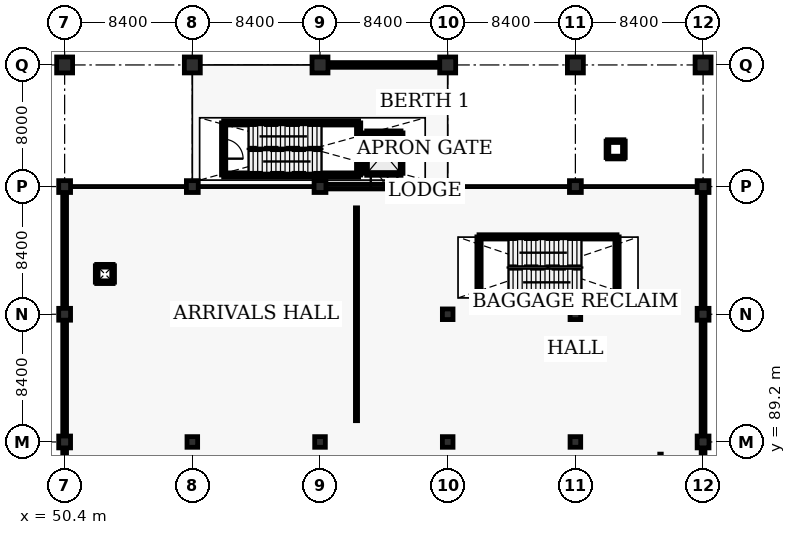
"""IFC4 building model, lengths in metres.
Left out: names, types, materials, properties, quantities, classifications, styles, units other than length and angle.
Written with IfcOpenShell. Run it as: python <this file> out.ifc"""

import sys

from ifc_helpers import new_model, si_unit, direction, frame, frame_2d, origin, origin_2d, place, context, subcontext, project, spatial, rectangle, circle, extrude, element, fill, save


model = new_model("IFC4")
c1 = context("Model", 3, precision=1e-05, world=origin(), true_north=direction((0.0, 1.0)))
c2 = subcontext(c1, "Body", "Model", "MODEL_VIEW")
j1 = project(units=[si_unit("LENGTHUNIT", "METRE"), si_unit("PLANEANGLEUNIT", "RADIAN")], contexts=[c1])
p1 = place(None, origin())
s1 = spatial("IfcSite", under=j1, at=p1, CompositionType="ELEMENT")
p2 = place(p1, origin())
s2 = spatial("IfcBuilding", under=s1, at=p2, CompositionType="ELEMENT")
p3 = place(p2, origin())
s3 = spatial("IfcBuildingStorey", under=s2, at=p3, CompositionType="ELEMENT", Elevation=0.0)
for number, where, z_axis, x_axis in (
    (1, (50.4, 89.2, -0.46), (0.0, 0.0, 1.0), (1.0, 0.0, 0.0)),
    (2, (50.4, 97.6, -0.46), (0.0, 0.0, 1.0), (1.0, 0.0, 0.0)),
    (3, (50.4, 106.0, -0.46), (0.0, 0.0, 1.0), (1.0, 0.0, 0.0)),
):
    element("IfcColumn", number, at=place(p3, frame(where, z_axis=z_axis, x_axis=x_axis)), inside=s3, PredefinedType="COLUMN", context=c2, shape_type="SweptSolid", body=[
        extrude(circle(Radius=0.39, at=origin_2d()), origin(), (0.0, 0.0, 1.0), 5.9),
    ])
for number, where, z_axis, x_axis in (
    (4, (58.8, 89.2, -0.46), (0.0, 0.0, 1.0), (1.0, 0.0, 0.0)),
    (5, (58.8, 97.6, -0.46), (0.0, 0.0, 1.0), (1.0, 0.0, 0.0)),
):
    element("IfcColumn", number, at=place(p3, frame(where, z_axis=z_axis, x_axis=x_axis)), inside=s3, PredefinedType="COLUMN", context=c2, shape_type="SweptSolid", body=[
        extrude(rectangle(XDim=0.7, YDim=0.7, at=origin_2d()), origin(), (0.0, 0.0, 1.0), 5.9),
    ])
p4 = place(p3, frame((58.8, 106.0, -0.46), z_axis=(0.0, 0.0, 1.0), x_axis=(1.0, 0.0, 0.0)))
e6 = element("IfcColumn", 6, at=p4, inside=s3, PredefinedType="COLUMN", context=c2, shape_type="SweptSolid", body=[
    extrude(circle(Radius=0.39, at=origin_2d()), origin(), (0.0, 0.0, 1.0), 5.9),
])
for number, where, z_axis, x_axis in (
    (7, (67.2, 89.2, -0.46), (0.0, 0.0, 1.0), (1.0, 0.0, 0.0)),
    (8, (67.2, 97.6, -0.46), (0.0, 0.0, 1.0), (1.0, 0.0, 0.0)),
):
    element("IfcColumn", number, at=place(p3, frame(where, z_axis=z_axis, x_axis=x_axis)), inside=s3, PredefinedType="COLUMN", context=c2, shape_type="SweptSolid", body=[
        extrude(rectangle(XDim=0.7, YDim=0.7, at=origin_2d()), origin(), (0.0, 0.0, 1.0), 5.9),
    ])
p5 = place(p3, frame((67.2, 106.0, -0.46), z_axis=(0.0, 0.0, 1.0), x_axis=(1.0, 0.0, 0.0)))
e9 = element("IfcColumn", 9, at=p5, inside=s3, PredefinedType="COLUMN", context=c2, shape_type="SweptSolid", body=[
    extrude(circle(Radius=0.39, at=origin_2d()), origin(), (0.0, 0.0, 1.0), 5.9),
])
for number, where, z_axis, x_axis in (
    (10, (75.6, 89.2, -0.46), (0.0, 0.0, 1.0), (1.0, 0.0, 0.0)),
    (11, (75.6, 97.6, -0.46), (0.0, 0.0, 1.0), (1.0, 0.0, 0.0)),
):
    element("IfcColumn", number, at=place(p3, frame(where, z_axis=z_axis, x_axis=x_axis)), inside=s3, PredefinedType="COLUMN", context=c2, shape_type="SweptSolid", body=[
        extrude(rectangle(XDim=0.7, YDim=0.7, at=origin_2d()), origin(), (0.0, 0.0, 1.0), 5.9),
    ])
p6 = place(p3, frame((75.6, 106.0, -0.46), z_axis=(0.0, 0.0, 1.0), x_axis=(1.0, 0.0, 0.0)))
e12 = element("IfcColumn", 12, at=p6, inside=s3, PredefinedType="COLUMN", context=c2, shape_type="SweptSolid", body=[
    extrude(circle(Radius=0.39, at=origin_2d()), origin(), (0.0, 0.0, 1.0), 5.9),
])
for number, where, z_axis, x_axis in (
    (13, (84.0, 89.2, -0.46), (0.0, 0.0, 1.0), (1.0, 0.0, 0.0)),
    (14, (84.0, 97.6, -0.46), (0.0, 0.0, 1.0), (1.0, 0.0, 0.0)),
):
    element("IfcColumn", number, at=place(p3, frame(where, z_axis=z_axis, x_axis=x_axis)), inside=s3, PredefinedType="COLUMN", context=c2, shape_type="SweptSolid", body=[
        extrude(rectangle(XDim=0.7, YDim=0.7, at=origin_2d()), origin(), (0.0, 0.0, 1.0), 5.9),
    ])
for number, where, z_axis, x_axis in (
    (15, (84.0, 106.0, -0.46), (0.0, 0.0, 1.0), (1.0, 0.0, 0.0)),
    (16, (92.4, 89.2, -0.46), (0.0, 0.0, 1.0), (1.0, 0.0, 0.0)),
    (17, (92.4, 97.6, -0.46), (0.0, 0.0, 1.0), (1.0, 0.0, 0.0)),
    (18, (92.4, 106.0, -0.46), (0.0, 0.0, 1.0), (1.0, 0.0, 0.0)),
):
    element("IfcColumn", number, at=place(p3, frame(where, z_axis=z_axis, x_axis=x_axis)), inside=s3, PredefinedType="COLUMN", context=c2, shape_type="SweptSolid", body=[
        extrude(circle(Radius=0.39, at=origin_2d()), origin(), (0.0, 0.0, 1.0), 5.9),
    ])
for number, where, z_axis, x_axis in (
    (19, (50.4, 114.0, -0.46), (0.0, 0.0, 1.0), (1.0, 0.0, 0.0)),
    (20, (58.8, 114.0, -0.46), (0.0, 0.0, 1.0), (1.0, 0.0, 0.0)),
    (21, (67.2, 114.0, -0.46), (0.0, 0.0, 1.0), (1.0, 0.0, 0.0)),
    (22, (75.6, 114.0, -0.46), (0.0, 0.0, 1.0), (1.0, 0.0, 0.0)),
    (23, (84.0, 114.0, -0.46), (0.0, 0.0, 1.0), (1.0, 0.0, 0.0)),
    (24, (92.4, 114.0, -0.46), (0.0, 0.0, 1.0), (1.0, 0.0, 0.0)),
):
    element("IfcColumn", number, at=place(p3, frame(where, z_axis=z_axis, x_axis=x_axis)), inside=s3, PredefinedType="PILASTER", context=c2, shape_type="SweptSolid", body=[
        extrude(circle(Radius=0.525, at=origin_2d()), origin(), (0.0, 0.0, 1.0), 5.9),
    ])
p7 = place(p3, frame((50.4, 88.81, 0.0), z_axis=(0.0, 0.0, 1.0), x_axis=(0.0, -1.0, 0.0)))
e25 = element("IfcWall", 25, at=p7, inside=s3, PredefinedType="SOLIDWALL", context=c2, shape_type="SweptSolid", body=[
    extrude(rectangle(XDim=7.62, YDim=0.25, at=frame_2d((3.81, 0.0))), origin(), (0.0, 0.0, 1.0), 4.605),
])
p8 = place(p7, frame((2.65, 0.0, 1.0)))
e26 = element("IfcOpeningElement", 26, at=p8, cuts=e25, PredefinedType="OPENING", context=c2, shape_type="SweptSolid", body=[
    extrude(rectangle(XDim=1.9, YDim=1.55, at=frame_2d((0.95, 0.775))), frame((0.0, 0.135, 0.0), z_axis=(0.0, -1.0, 0.0), x_axis=(1.0, 0.0, 0.0)), (0.0, 0.0, 1.0), 0.27),
])
p9 = place(p3, frame((92.4, 81.19, 0.0), z_axis=(0.0, 0.0, 1.0), x_axis=(0.0, 1.0, 0.0)))
e27 = element("IfcWall", 27, at=p9, inside=s3, PredefinedType="SOLIDWALL", context=c2, shape_type="SweptSolid", body=[
    extrude(rectangle(XDim=7.62, YDim=0.25, at=frame_2d((3.81, 0.0))), origin(), (0.0, 0.0, 1.0), 4.605),
])
p10 = place(p9, frame((2.65, 0.0, 1.0)))
e28 = element("IfcOpeningElement", 28, at=p10, cuts=e27, PredefinedType="OPENING", context=c2, shape_type="SweptSolid", body=[
    extrude(rectangle(XDim=1.9, YDim=1.55, at=frame_2d((0.95, 0.775))), frame((0.0, 0.135, 0.0), z_axis=(0.0, -1.0, 0.0), x_axis=(1.0, 0.0, 0.0)), (0.0, 0.0, 1.0), 0.27),
])
p11 = place(p3, frame((50.4, 97.21, 0.0), z_axis=(0.0, 0.0, 1.0), x_axis=(0.0, -1.0, 0.0)))
e29 = element("IfcWall", 29, at=p11, inside=s3, PredefinedType="SOLIDWALL", context=c2, shape_type="SweptSolid", body=[
    extrude(rectangle(XDim=7.62, YDim=0.25, at=frame_2d((3.81, 0.0))), origin(), (0.0, 0.0, 1.0), 4.825),
])
p12 = place(p11, frame((2.65, 0.0, 1.0)))
e30 = element("IfcOpeningElement", 30, at=p12, cuts=e29, PredefinedType="OPENING", context=c2, shape_type="SweptSolid", body=[
    extrude(rectangle(XDim=2.5, YDim=1.05, at=frame_2d((1.25, 0.525))), frame((0.0, 0.135, 0.0), z_axis=(0.0, -1.0, 0.0), x_axis=(1.0, 0.0, 0.0)), (0.0, 0.0, 1.0), 0.27),
])
p13 = place(p3, frame((92.4, 89.59, 0.0), z_axis=(0.0, 0.0, 1.0), x_axis=(0.0, 1.0, 0.0)))
e31 = element("IfcWall", 31, at=p13, inside=s3, PredefinedType="SOLIDWALL", context=c2, shape_type="SweptSolid", body=[
    extrude(rectangle(XDim=7.62, YDim=0.25, at=frame_2d((3.81, 0.0))), origin(), (0.0, 0.0, 1.0), 4.605),
])
p14 = place(p13, frame((2.65, 0.0, 1.0)))
e32 = element("IfcOpeningElement", 32, at=p14, cuts=e31, PredefinedType="OPENING", context=c2, shape_type="SweptSolid", body=[
    extrude(rectangle(XDim=2.5, YDim=1.05, at=frame_2d((1.25, 0.525))), frame((0.0, 0.135, 0.0), z_axis=(0.0, -1.0, 0.0), x_axis=(1.0, 0.0, 0.0)), (0.0, 0.0, 1.0), 0.27),
])
p15 = place(p3, frame((50.4, 105.61, 0.0), z_axis=(0.0, 0.0, 1.0), x_axis=(0.0, -1.0, 0.0)))
e33 = element("IfcWall", 33, at=p15, inside=s3, PredefinedType="SOLIDWALL", context=c2, shape_type="SweptSolid", body=[
    extrude(rectangle(XDim=7.62, YDim=0.25, at=frame_2d((3.81, 0.0))), origin(), (0.0, 0.0, 1.0), 4.605),
])
p16 = place(p15, frame((2.65, 0.0, 1.0)))
e34 = element("IfcOpeningElement", 34, at=p16, cuts=e33, PredefinedType="OPENING", context=c2, shape_type="SweptSolid", body=[
    extrude(rectangle(XDim=2.7, YDim=1.65, at=frame_2d((1.35, 0.825))), frame((0.0, 0.135, 0.0), z_axis=(0.0, -1.0, 0.0), x_axis=(1.0, 0.0, 0.0)), (0.0, 0.0, 1.0), 0.27),
])
p17 = place(p3, frame((92.4, 97.99, 0.0), z_axis=(0.0, 0.0, 1.0), x_axis=(0.0, 1.0, 0.0)))
e35 = element("IfcWall", 35, at=p17, inside=s3, PredefinedType="SOLIDWALL", context=c2, shape_type="SweptSolid", body=[
    extrude(rectangle(XDim=7.62, YDim=0.25, at=frame_2d((3.81, 0.0))), origin(), (0.0, 0.0, 1.0), 4.605),
])
p18 = place(p17, frame((2.65, 0.0, 1.0)))
e36 = element("IfcOpeningElement", 36, at=p18, cuts=e35, PredefinedType="OPENING", context=c2, shape_type="SweptSolid", body=[
    extrude(rectangle(XDim=2.7, YDim=1.65, at=frame_2d((1.35, 0.825))), frame((0.0, 0.135, 0.0), z_axis=(0.0, -1.0, 0.0), x_axis=(1.0, 0.0, 0.0)), (0.0, 0.0, 1.0), 0.27),
])
p19 = place(p3, frame((67.59, 106.0, 0.0), z_axis=(0.0, 0.0, 1.0), x_axis=(1.0, 0.0, 0.0)))
e37 = element("IfcWall", 37, at=p19, inside=s3, PredefinedType="SOLIDWALL", context=c2, shape_type="SweptSolid", body=[
    extrude(rectangle(XDim=7.62, YDim=0.31, at=frame_2d((3.81, 0.0))), origin(), (0.0, 0.0, 1.0), 4.605),
])
p20 = place(p19, frame((2.95, 0.0, 0.0)))
e38 = element("IfcOpeningElement", 38, at=p20, cuts=e37, PredefinedType="OPENING", context=c2, shape_type="SweptSolid", body=[
    extrude(rectangle(XDim=1.75, YDim=2.15, at=frame_2d((0.875, 1.075))), frame((0.0, 0.165, 0.0), z_axis=(0.0, -1.0, 0.0), x_axis=(1.0, 0.0, 0.0)), (0.0, 0.0, 1.0), 0.33),
])
p21 = place(p19, frame((5.45, 0.0, 1.05)))
e39 = element("IfcOpeningElement", 39, at=p21, cuts=e37, PredefinedType="OPENING", context=c2, shape_type="SweptSolid", body=[
    extrude(rectangle(XDim=1.4, YDim=1.25, at=frame_2d((0.7, 0.625))), frame((0.0, 0.165, 0.0), z_axis=(0.0, -1.0, 0.0), x_axis=(1.0, 0.0, 0.0)), (0.0, 0.0, 1.0), 0.33),
])
p22 = place(p3, frame((75.075, 114.0, 0.0), z_axis=(0.0, 0.0, 1.0), x_axis=(-1.0, 0.0, 0.0)))
e40 = element("IfcWall", 40, at=p22, inside=s3, PredefinedType="SOLIDWALL", context=c2, shape_type="SweptSolid", body=[
    extrude(rectangle(XDim=7.35, YDim=0.31, at=frame_2d((3.675, 0.0))), origin(), (0.0, 0.0, 1.0), 4.835),
])
p23 = place(p22, frame((2.815, 0.0, 1.05)))
e41 = element("IfcOpeningElement", 41, at=p23, cuts=e40, PredefinedType="OPENING", context=c2, shape_type="SweptSolid", body=[
    extrude(rectangle(XDim=1.4, YDim=1.25, at=frame_2d((0.7, 0.625))), frame((0.0, 0.165, 0.0), z_axis=(0.0, -1.0, 0.0), x_axis=(1.0, 0.0, 0.0)), (0.0, 0.0, 1.0), 0.33),
])
for number, where, z_axis, x_axis in (
    (42, (60.86, 106.76, 0.0), (0.0, 0.0, 1.0), (1.0, 0.0, 0.0)),
    (43, (60.86, 110.19, 0.0), (0.0, 0.0, 1.0), (1.0, 0.0, 0.0)),
):
    element("IfcWall", number, at=place(p3, frame(where, z_axis=z_axis, x_axis=x_axis)), inside=s3, PredefinedType="SHEAR", context=c2, shape_type="SweptSolid", body=[
        extrude(rectangle(XDim=8.88, YDim=0.28, at=frame_2d((4.44, 0.0))), origin(), (0.0, 0.0, 1.0), 5.44),
    ])
p24 = place(p3, frame((60.86, 110.19, 0.0), z_axis=(0.0, 0.0, 1.0), x_axis=(0.0, -1.0, 0.0)))
e44 = element("IfcWall", 44, at=p24, inside=s3, PredefinedType="SHEAR", context=c2, shape_type="SweptSolid", body=[
    extrude(rectangle(XDim=3.43, YDim=0.28, at=frame_2d((1.715, 0.0))), origin(), (0.0, 0.0, 1.0), 5.44),
])
p25 = place(p24, frame((1.075, 0.0, 0.0)))
e45 = element("IfcOpeningElement", 45, at=p25, cuts=e44, PredefinedType="OPENING", context=c2, shape_type="SweptSolid", body=[
    extrude(rectangle(XDim=1.28, YDim=2.1, at=frame_2d((0.64, 1.05))), frame((0.0, 0.15, 0.0), z_axis=(0.0, -1.0, 0.0), x_axis=(1.0, 0.0, 0.0)), (0.0, 0.0, 1.0), 0.3),
])
p26 = place(p3, frame((69.74, 106.76, 0.0), z_axis=(0.0, 0.0, 1.0), x_axis=(0.0, 1.0, 0.0)))
e46 = element("IfcWall", 46, at=p26, inside=s3, PredefinedType="SHEAR", context=c2, shape_type="SweptSolid", body=[
    extrude(rectangle(XDim=3.43, YDim=0.28, at=frame_2d((1.715, 0.0))), origin(), (0.0, 0.0, 1.0), 5.44),
])
p27 = place(p3, frame((70.27, 106.87, 0.0), z_axis=(0.0, 0.0, 1.0), x_axis=(1.0, 0.0, 0.0)))
e47 = element("IfcWall", 47, at=p27, inside=s3, PredefinedType="SHEAR", context=c2, shape_type="SweptSolid", body=[
    extrude(rectangle(XDim=2.26, YDim=0.26, at=frame_2d((1.13, 0.0))), origin(), (0.0, 0.0, 1.0), 5.44),
])
for number, where, z_axis, x_axis in (
    (48, (72.53, 106.87, 0.0), (0.0, 0.0, 1.0), (0.0, 1.0, 0.0)),
    (49, (70.27, 109.53, 0.0), (0.0, 0.0, 1.0), (0.0, -1.0, 0.0)),
):
    element("IfcWall", number, at=place(p3, frame(where, z_axis=z_axis, x_axis=x_axis)), inside=s3, PredefinedType="SHEAR", context=c2, shape_type="SweptSolid", body=[
        extrude(rectangle(XDim=2.66, YDim=0.26, at=frame_2d((1.33, 0.0))), origin(), (0.0, 0.0, 1.0), 5.44),
    ])
p28 = place(p3, frame((70.27, 109.53, 0.0), z_axis=(0.0, 0.0, 1.0), x_axis=(1.0, 0.0, 0.0)))
e50 = element("IfcWall", 50, at=p28, inside=s3, PredefinedType="SHEAR", context=c2, shape_type="SweptSolid", body=[
    extrude(rectangle(XDim=2.26, YDim=0.26, at=frame_2d((1.13, 0.0))), origin(), (0.0, 0.0, 1.0), 5.44),
])
p29 = place(p28, frame((0.51, 0.0, 0.0)))
e51 = element("IfcOpeningElement", 51, at=p29, cuts=e50, PredefinedType="OPENING", context=c2, shape_type="SweptSolid", body=[
    extrude(rectangle(XDim=1.24, YDim=2.14, at=frame_2d((0.62, 1.07))), frame((0.0, 0.14, 0.0), z_axis=(0.0, -1.0, 0.0), x_axis=(1.0, 0.0, 0.0)), (0.0, 0.0, 1.0), 0.28),
])
for number, where, z_axis, x_axis in (
    (52, (77.66, 98.66, 0.0), (0.0, 0.0, 1.0), (1.0, 0.0, 0.0)),
    (53, (77.66, 102.69, 0.0), (0.0, 0.0, 1.0), (1.0, 0.0, 0.0)),
):
    element("IfcWall", number, at=place(p3, frame(where, z_axis=z_axis, x_axis=x_axis)), inside=s3, PredefinedType="SHEAR", context=c2, shape_type="SweptSolid", body=[
        extrude(rectangle(XDim=9.08, YDim=0.28, at=frame_2d((4.54, 0.0))), origin(), (0.0, 0.0, 1.0), 5.44),
    ])
p30 = place(p3, frame((77.66, 102.69, 0.0), z_axis=(0.0, 0.0, 1.0), x_axis=(0.0, -1.0, 0.0)))
e54 = element("IfcWall", 54, at=p30, inside=s3, PredefinedType="SHEAR", context=c2, shape_type="SweptSolid", body=[
    extrude(rectangle(XDim=4.03, YDim=0.28, at=frame_2d((2.015, 0.0))), origin(), (0.0, 0.0, 1.0), 5.44),
])
p31 = place(p30, frame((1.035, 0.0, 0.0)))
e55 = element("IfcOpeningElement", 55, at=p31, cuts=e54, PredefinedType="OPENING", context=c2, shape_type="SweptSolid", body=[
    extrude(rectangle(XDim=1.96, YDim=2.22, at=frame_2d((0.98, 1.11))), frame((0.0, 0.15, 0.0), z_axis=(0.0, -1.0, 0.0), x_axis=(1.0, 0.0, 0.0)), (0.0, 0.0, 1.0), 0.3),
])
p32 = place(p3, frame((86.74, 98.66, 0.0), z_axis=(0.0, 0.0, 1.0), x_axis=(0.0, 1.0, 0.0)))
e56 = element("IfcWall", 56, at=p32, inside=s3, PredefinedType="SHEAR", context=c2, shape_type="SweptSolid", body=[
    extrude(rectangle(XDim=4.03, YDim=0.28, at=frame_2d((2.015, 0.0))), origin(), (0.0, 0.0, 1.0), 5.44),
])
for number, where, z_axis, x_axis in (
    (57, (52.51, 99.71, 0.0), (0.0, 0.0, 1.0), (1.0, 0.0, 0.0)),
    (58, (53.59, 99.71, 0.0), (0.0, 0.0, 1.0), (0.0, 1.0, 0.0)),
    (59, (53.59, 100.79, 0.0), (0.0, 0.0, 1.0), (-1.0, 0.0, 0.0)),
    (60, (52.51, 100.79, 0.0), (0.0, 0.0, 1.0), (0.0, -1.0, 0.0)),
):
    element("IfcWall", number, at=place(p3, frame(where, z_axis=z_axis, x_axis=x_axis)), inside=s3, PredefinedType="SOLIDWALL", context=c2, shape_type="SweptSolid", body=[
        extrude(rectangle(XDim=1.08, YDim=0.18, at=frame_2d((0.54, 0.0))), origin(), (0.0, 0.0, 1.0), 2.6),
    ])
p33 = place(p3, frame((86.11, 107.91, 0.0), z_axis=(0.0, 0.0, 1.0), x_axis=(1.0, 0.0, 0.0)))
e61 = element("IfcWall", 61, at=p33, inside=s3, PredefinedType="SOLIDWALL", context=c2, shape_type="SweptSolid", body=[
    extrude(rectangle(XDim=1.08, YDim=0.18, at=frame_2d((0.54, 0.0))), origin(), (0.0, 0.0, 1.0), 2.6),
])
p34 = place(p3, frame((87.19, 107.91, 0.0), z_axis=(0.0, 0.0, 1.0), x_axis=(0.0, 1.0, 0.0)))
e62 = element("IfcWall", 62, at=p34, inside=s3, PredefinedType="SOLIDWALL", context=c2, shape_type="SweptSolid", body=[
    extrude(rectangle(XDim=1.08, YDim=0.18, at=frame_2d((0.54, 0.0))), origin(), (0.0, 0.0, 1.0), 2.6),
])
p35 = place(p3, frame((87.19, 108.99, 0.0), z_axis=(0.0, 0.0, 1.0), x_axis=(-1.0, 0.0, 0.0)))
e63 = element("IfcWall", 63, at=p35, inside=s3, PredefinedType="SOLIDWALL", context=c2, shape_type="SweptSolid", body=[
    extrude(rectangle(XDim=1.08, YDim=0.18, at=frame_2d((0.54, 0.0))), origin(), (0.0, 0.0, 1.0), 2.6),
])
p36 = place(p3, frame((86.11, 108.99, 0.0), z_axis=(0.0, 0.0, 1.0), x_axis=(0.0, -1.0, 0.0)))
e64 = element("IfcWall", 64, at=p36, inside=s3, PredefinedType="SOLIDWALL", context=c2, shape_type="SweptSolid", body=[
    extrude(rectangle(XDim=1.08, YDim=0.18, at=frame_2d((0.54, 0.0))), origin(), (0.0, 0.0, 1.0), 2.6),
])
p37 = place(p3, frame((69.6, 90.6, 0.0), z_axis=(0.0, 0.0, 1.0), x_axis=(0.0, 1.0, 0.0)))
e65 = element("IfcWall", 65, at=p37, inside=s3, PredefinedType="PARTITIONING", context=c2, shape_type="SweptSolid", body=[
    extrude(rectangle(XDim=14.0, YDim=0.14, at=frame_2d((7.0, 0.0))), origin(), (0.0, 0.0, 1.0), 3.1),
])
p38 = place(p37, frame((2.4, 0.0, 0.0)))
e66 = element("IfcOpeningElement", 66, at=p38, cuts=e65, PredefinedType="OPENING", context=c2, shape_type="SweptSolid", body=[
    extrude(rectangle(XDim=2.1, YDim=2.22, at=frame_2d((1.05, 1.11))), frame((0.0, 0.08, 0.0), z_axis=(0.0, -1.0, 0.0), x_axis=(1.0, 0.0, 0.0)), (0.0, 0.0, 1.0), 0.16),
])
p39 = place(p3, frame((89.6, 73.2, 0.0), z_axis=(0.0, 0.0, 1.0), x_axis=(0.0, 1.0, 0.0)))
e67 = element("IfcWall", 67, at=p39, inside=s3, PredefinedType="PARTITIONING", context=c2, shape_type="SweptSolid", body=[
    extrude(rectangle(XDim=15.2, YDim=0.1, at=frame_2d((7.6, 0.0))), origin(), (0.0, 0.0, 1.0), 3.0),
])
p40 = place(p39, frame((10.6, 0.0, 0.0)))
e68 = element("IfcOpeningElement", 68, at=p40, cuts=e67, PredefinedType="OPENING", context=c2, shape_type="SweptSolid", body=[
    extrude(rectangle(XDim=1.06, YDim=2.1, at=frame_2d((0.53, 1.05))), frame((0.0, 0.06, 0.0), z_axis=(0.0, -1.0, 0.0), x_axis=(1.0, 0.0, 0.0)), (0.0, 0.0, 1.0), 0.12),
])
p41 = place(p12, origin())
e69 = element("IfcWindow", 69, at=p41, inside=s3, PartitioningType="TRIPLE_PANEL_VERTICAL", PredefinedType="WINDOW", context=c2, shape_type="SweptSolid", body=[
    extrude(rectangle(XDim=2.5, YDim=1.05, at=frame_2d((1.25, 0.525))), frame((0.0, 0.03, 0.0), z_axis=(0.0, -1.0, 0.0), x_axis=(1.0, 0.0, 0.0)), (0.0, 0.0, 1.0), 0.06),
])
fill(e30, e69)
p42 = place(p14, origin())
e70 = element("IfcWindow", 70, at=p42, inside=s3, PartitioningType="TRIPLE_PANEL_VERTICAL", PredefinedType="WINDOW", context=c2, shape_type="SweptSolid", body=[
    extrude(rectangle(XDim=2.5, YDim=1.05, at=frame_2d((1.25, 0.525))), frame((0.0, 0.03, 0.0), z_axis=(0.0, -1.0, 0.0), x_axis=(1.0, 0.0, 0.0)), (0.0, 0.0, 1.0), 0.06),
])
fill(e32, e70)
p43 = place(p16, origin())
e71 = element("IfcWindow", 71, at=p43, inside=s3, PartitioningType="TRIPLE_PANEL_VERTICAL", PredefinedType="WINDOW", context=c2, shape_type="SweptSolid", body=[
    extrude(rectangle(XDim=2.7, YDim=1.65, at=frame_2d((1.35, 0.825))), frame((0.0, 0.03, 0.0), z_axis=(0.0, -1.0, 0.0), x_axis=(1.0, 0.0, 0.0)), (0.0, 0.0, 1.0), 0.06),
])
fill(e34, e71)
p44 = place(p18, origin())
e72 = element("IfcWindow", 72, at=p44, inside=s3, PartitioningType="TRIPLE_PANEL_VERTICAL", PredefinedType="WINDOW", context=c2, shape_type="SweptSolid", body=[
    extrude(rectangle(XDim=2.7, YDim=1.65, at=frame_2d((1.35, 0.825))), frame((0.0, 0.03, 0.0), z_axis=(0.0, -1.0, 0.0), x_axis=(1.0, 0.0, 0.0)), (0.0, 0.0, 1.0), 0.06),
])
fill(e36, e72)
p45 = place(p20, origin())
e73 = element("IfcDoor", 73, at=p45, inside=s3, OperationType="DOUBLE_DOOR_SINGLE_SWING", PredefinedType="DOOR", context=c2, shape_type="SweptSolid", body=[
    extrude(rectangle(XDim=1.75, YDim=2.15, at=frame_2d((0.875, 1.075))), frame((0.0, 0.025, 0.0), z_axis=(0.0, -1.0, 0.0), x_axis=(1.0, 0.0, 0.0)), (0.0, 0.0, 1.0), 0.05),
])
fill(e38, e73)
p46 = place(p21, origin())
e74 = element("IfcWindow", 74, at=p46, inside=s3, PartitioningType="SINGLE_PANEL", PredefinedType="WINDOW", context=c2, shape_type="SweptSolid", body=[
    extrude(rectangle(XDim=1.4, YDim=1.25, at=frame_2d((0.7, 0.625))), frame((0.0, 0.03, 0.0), z_axis=(0.0, -1.0, 0.0), x_axis=(1.0, 0.0, 0.0)), (0.0, 0.0, 1.0), 0.06),
])
fill(e39, e74)
p47 = place(p23, origin())
e75 = element("IfcWindow", 75, at=p47, inside=s3, PartitioningType="SINGLE_PANEL", PredefinedType="WINDOW", context=c2, shape_type="SweptSolid", body=[
    extrude(rectangle(XDim=1.4, YDim=1.25, at=frame_2d((0.7, 0.625))), frame((0.0, 0.03, 0.0), z_axis=(0.0, -1.0, 0.0), x_axis=(1.0, 0.0, 0.0)), (0.0, 0.0, 1.0), 0.06),
])
fill(e41, e75)
p48 = place(p25, origin())
e76 = element("IfcDoor", 76, at=p48, inside=s3, OperationType="SINGLE_SWING_RIGHT", PredefinedType="DOOR", context=c2, shape_type="SweptSolid", body=[
    extrude(rectangle(XDim=1.28, YDim=2.1, at=frame_2d((0.64, 1.05))), frame((0.0, 0.025, 0.0), z_axis=(0.0, -1.0, 0.0), x_axis=(1.0, 0.0, 0.0)), (0.0, 0.0, 1.0), 0.05),
])
fill(e45, e76)
p49 = place(p29, origin())
e77 = element("IfcDoor", 77, at=p49, inside=s3, OperationType="DOUBLE_DOOR_SLIDING", PredefinedType="DOOR", context=c2, shape_type="SweptSolid", body=[
    extrude(rectangle(XDim=1.24, YDim=2.14, at=frame_2d((0.62, 1.07))), frame((0.0, 0.025, 0.0), z_axis=(0.0, -1.0, 0.0), x_axis=(1.0, 0.0, 0.0)), (0.0, 0.0, 1.0), 0.05),
])
fill(e51, e77)
p50 = place(p31, origin())
e78 = element("IfcDoor", 78, at=p50, inside=s3, OperationType="DOUBLE_DOOR_SLIDING", PredefinedType="DOOR", context=c2, shape_type="SweptSolid", body=[
    extrude(rectangle(XDim=1.96, YDim=2.22, at=frame_2d((0.98, 1.11))), frame((0.0, 0.025, 0.0), z_axis=(0.0, -1.0, 0.0), x_axis=(1.0, 0.0, 0.0)), (0.0, 0.0, 1.0), 0.05),
])
fill(e55, e78)
p51 = place(p38, origin())
e79 = element("IfcDoor", 79, at=p51, inside=s3, OperationType="DOUBLE_DOOR_SLIDING", PredefinedType="DOOR", context=c2, shape_type="SweptSolid", body=[
    extrude(rectangle(XDim=2.1, YDim=2.22, at=frame_2d((1.05, 1.11))), frame((0.0, 0.025, 0.0), z_axis=(0.0, -1.0, 0.0), x_axis=(1.0, 0.0, 0.0)), (0.0, 0.0, 1.0), 0.05),
])
fill(e66, e79)
save(model, sys.argv[1])
